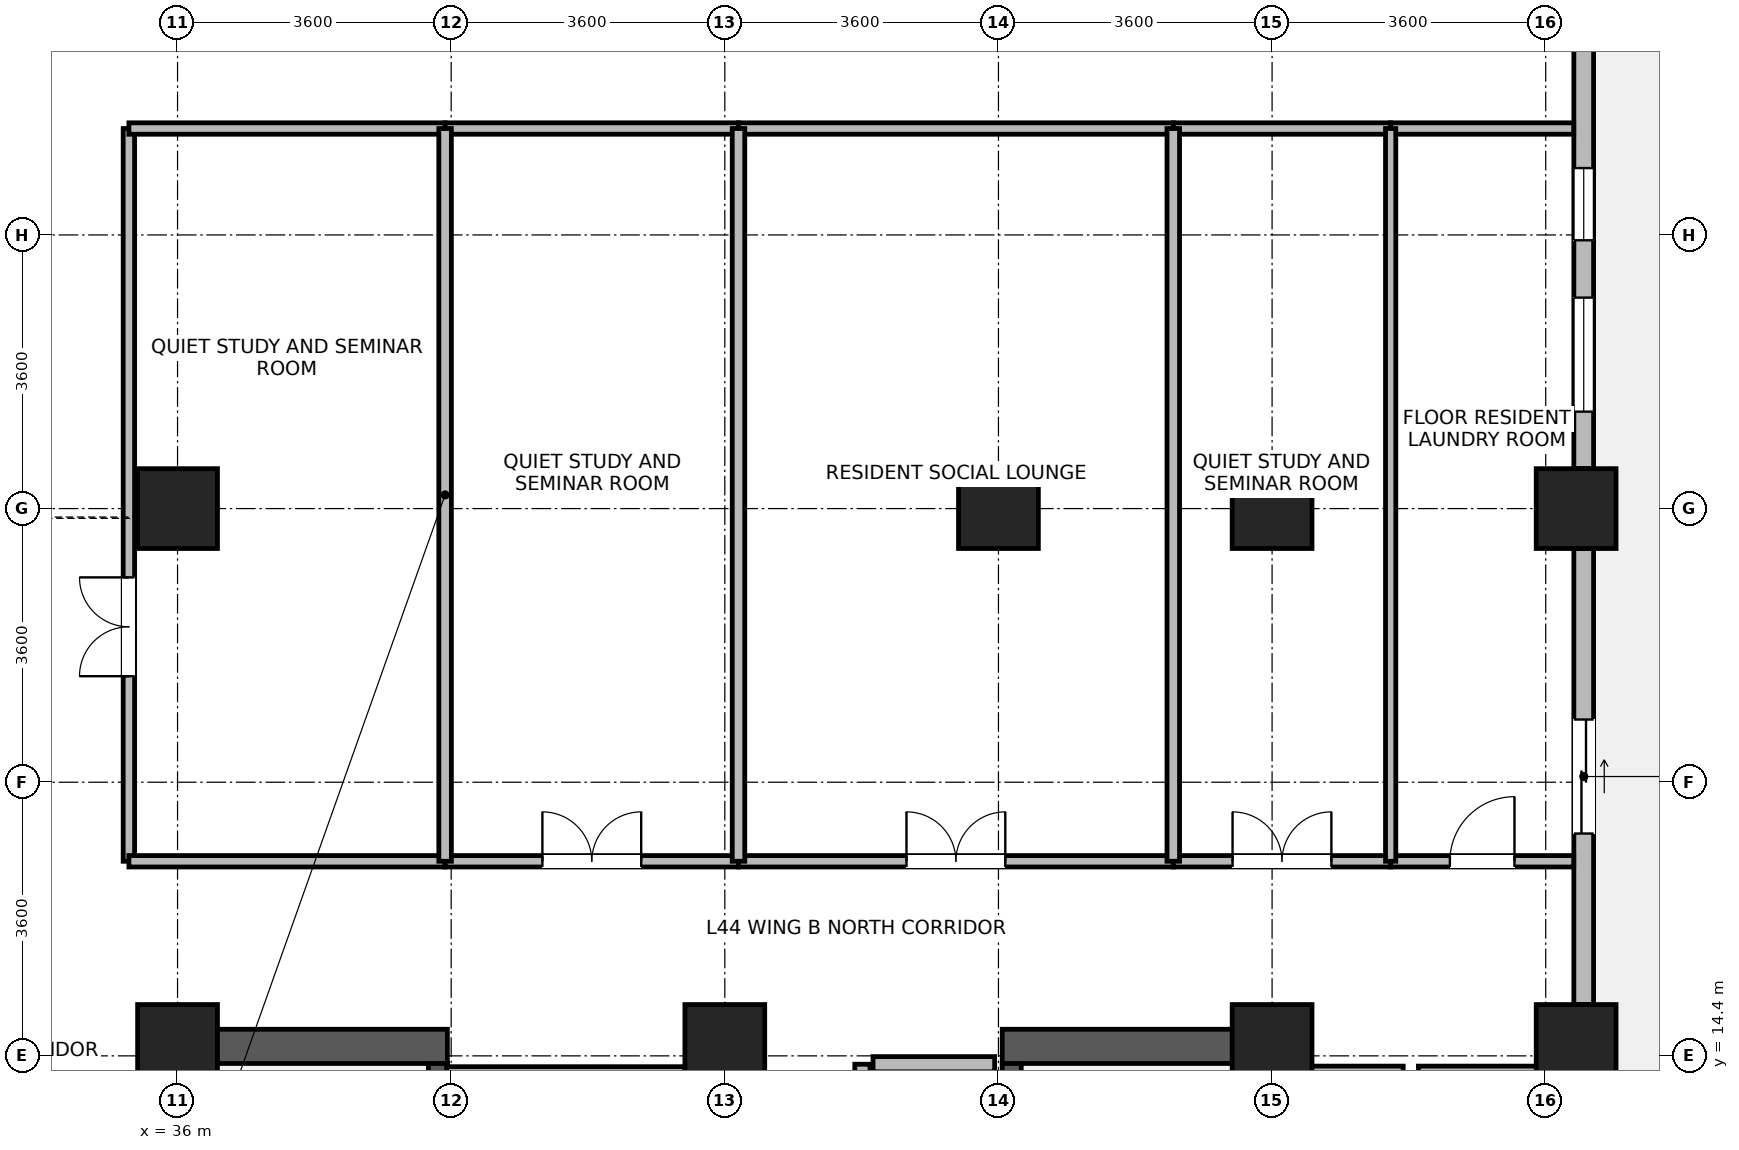
"""IFC4 building model, lengths in metres.
Left out: names, types, materials, properties, quantities, classifications, styles, units other than length and angle.
Written with IfcOpenShell. Run it as: python <this file> out.ifc"""

import sys

from ifc_helpers import new_model, si_unit, direction, frame, frame_2d, origin, origin_2d, place, context, subcontext, project, spatial, rectangle, extrude, source, transform, mapped, element, fill, save


model = new_model("IFC4")
c1 = context("Model", 3, precision=1e-05, world=origin(), true_north=direction((0.0, 1.0)))
c2 = subcontext(c1, "Body", "Model", "MODEL_VIEW")
j1 = project(units=[si_unit("LENGTHUNIT", "METRE"), si_unit("PLANEANGLEUNIT", "RADIAN")], contexts=[c1])
p1 = place(None, origin())
s1 = spatial("IfcSite", under=j1, at=p1, CompositionType="ELEMENT")
p2 = place(p1, origin())
s2 = spatial("IfcBuilding", under=s1, at=p2, CompositionType="ELEMENT")
p3 = place(p2, frame((0.0, 0.0, 173.5)))
s3 = spatial("IfcBuildingStorey", under=s2, at=p3, CompositionType="ELEMENT", Elevation=173.5)
for number, where, z_axis, x_axis in (
    (1, (36.125, 6.85, 0.0), (0.0, 0.0, 1.0), (0.0, 1.0, 0.0)),
    (2, (50.275, 6.85, 0.0), (0.0, 0.0, 1.0), (0.0, 1.0, 0.0)),
):
    element("IfcWall", number, at=place(p3, frame(where, z_axis=z_axis, x_axis=x_axis)), inside=s3, PredefinedType="SHEAR", context=c2, shape_type="SweptSolid", body=[
        extrude(rectangle(XDim=7.9, YDim=0.45, at=frame_2d((3.95, 0.0))), origin(), (0.0, 0.0, 1.0), 3.46),
    ])
for number, where, z_axis, x_axis in (
    (3, (36.35, 14.525, 0.0), (0.0, 0.0, 1.0), (1.0, 0.0, 0.0)),
    (4, (46.85, 14.525, 0.0), (0.0, 0.0, 1.0), (1.0, 0.0, 0.0)),
):
    element("IfcWall", number, at=place(p3, frame(where, z_axis=z_axis, x_axis=x_axis)), inside=s3, PredefinedType="SHEAR", context=c2, shape_type="SweptSolid", body=[
        extrude(rectangle(XDim=3.2, YDim=0.45, at=frame_2d((1.6, 0.0))), origin(), (0.0, 0.0, 1.0), 3.46),
    ])
p4 = place(p3, frame((39.425, 7.3, 0.0), z_axis=(0.0, 0.0, 1.0), x_axis=(0.0, 1.0, 0.0)))
e5 = element("IfcWall", 5, at=p4, inside=s3, PredefinedType="SHEAR", context=c2, shape_type="SweptSolid", body=[
    extrude(rectangle(XDim=7.0, YDim=0.25, at=frame_2d((3.5, 0.0))), origin(), (0.0, 0.0, 1.0), 3.46),
])
p5 = place(p4, frame((0.15, 0.0, 0.0)))
e6 = element("IfcOpeningElement", 6, at=p5, cuts=e5, PredefinedType="OPENING", context=c2, shape_type="SweptSolid", body=[
    extrude(rectangle(XDim=1.1, YDim=2.08, at=frame_2d((0.55, 1.04))), frame((0.0, 0.135, 0.0), z_axis=(0.0, -1.0, 0.0), x_axis=(1.0, 0.0, 0.0)), (0.0, 0.0, 1.0), 0.27),
])
p6 = place(p3, frame((46.975, 7.3, 0.0), z_axis=(0.0, 0.0, 1.0), x_axis=(0.0, 1.0, 0.0)))
e7 = element("IfcWall", 7, at=p6, inside=s3, PredefinedType="SHEAR", context=c2, shape_type="SweptSolid", body=[
    extrude(rectangle(XDim=7.0, YDim=0.25, at=frame_2d((3.5, 0.0))), origin(), (0.0, 0.0, 1.0), 3.46),
])
p7 = place(p6, frame((0.15, 0.0, 0.0)))
e8 = element("IfcOpeningElement", 8, at=p7, cuts=e7, PredefinedType="OPENING", context=c2, shape_type="SweptSolid", body=[
    extrude(rectangle(XDim=1.1, YDim=2.08, at=frame_2d((0.55, 1.04))), frame((0.0, 0.135, 0.0), z_axis=(0.0, -1.0, 0.0), x_axis=(1.0, 0.0, 0.0)), (0.0, 0.0, 1.0), 0.27),
])
m1 = source(origin(), c2, "Body", "SweptSolid", [
    extrude(rectangle(XDim=1.05, YDim=1.05, at=origin_2d()), origin(), (0.0, 0.0, 1.0), 3.7),
])
for number, where, z_axis, x_axis in (
    (9, (36.0, 21.6, 0.0), (0.0, 0.0, 1.0), (1.0, 0.0, 0.0)),
    (10, (46.8, 21.6, 0.0), (0.0, 0.0, 1.0), (1.0, 0.0, 0.0)),
    (11, (36.0, 14.55, 0.0), (0.0, 0.0, 1.0), (1.0, 0.0, 0.0)),
    (12, (43.2, 14.55, 0.0), (0.0, 0.0, 1.0), (1.0, 0.0, 0.0)),
    (13, (50.4, 14.55, 0.0), (0.0, 0.0, 1.0), (1.0, 0.0, 0.0)),
    (14, (50.4, 21.6, 0.0), (0.0, 0.0, 1.0), (1.0, 0.0, 0.0)),
    (15, (54.4, 14.55, 0.0), (0.0, 0.0, 1.0), (1.0, 0.0, 0.0)),
    (16, (54.4, 21.6, 0.0), (0.0, 0.0, 1.0), (1.0, 0.0, 0.0)),
):
    element("IfcColumn", number, at=place(p3, frame(where, z_axis=z_axis, x_axis=x_axis)), inside=s3, PredefinedType="COLUMN", context=c2, shape_type="MappedRepresentation", body=[
        mapped(m1, transform((0.0, 0.0, 0.0), x_axis=(1.0, 0.0, 0.0), y_axis=(0.0, 1.0, 0.0), z_axis=(0.0, 0.0, 1.0), scale=1.0)),
    ])
p8 = place(p3, frame((54.5, 21.074, 0.0), z_axis=(0.0, 0.0, 1.0), x_axis=(0.0, -1.0, 0.0)))
e17 = element("IfcWall", 17, at=p8, inside=s3, PredefinedType="STANDARD", context=c2, shape_type="SweptSolid", body=[
    extrude(rectangle(XDim=5.998, YDim=0.26, at=frame_2d((2.999, 0.0))), origin(), (0.0, 0.0, 1.0), 2.99),
])
p9 = place(p8, frame((2.249, 0.0, 0.0)))
e18 = element("IfcOpeningElement", 18, at=p9, cuts=e17, PredefinedType="OPENING", context=c2, shape_type="SweptSolid", body=[
    extrude(rectangle(XDim=1.5, YDim=2.15, at=frame_2d((0.75, 1.075))), frame((0.0, 0.14, 0.0), z_axis=(0.0, -1.0, 0.0), x_axis=(1.0, 0.0, 0.0)), (0.0, 0.0, 1.0), 0.28),
])
p10 = place(p3, frame((54.5, 28.124, 0.0), z_axis=(0.0, 0.0, 1.0), x_axis=(0.0, -1.0, 0.0)))
e19 = element("IfcWall", 19, at=p10, inside=s3, PredefinedType="STANDARD", context=c2, shape_type="SweptSolid", body=[
    extrude(rectangle(XDim=5.998, YDim=0.26, at=frame_2d((2.999, 0.0))), origin(), (0.0, 0.0, 1.0), 2.99),
])
p11 = place(p10, frame((3.749, 0.0, 0.85)))
e20 = element("IfcOpeningElement", 20, at=p11, cuts=e19, PredefinedType="OPENING", context=c2, shape_type="SweptSolid", body=[
    extrude(rectangle(XDim=1.5, YDim=1.85, at=frame_2d((0.75, 0.925))), frame((0.0, 0.14, 0.0), z_axis=(0.0, -1.0, 0.0), x_axis=(1.0, 0.0, 0.0)), (0.0, 0.0, 1.0), 0.28),
])
p12 = place(p10, frame((2.044, 0.0, 0.85)))
e21 = element("IfcOpeningElement", 21, at=p12, cuts=e19, PredefinedType="OPENING", context=c2, shape_type="SweptSolid", body=[
    extrude(rectangle(XDim=0.95, YDim=1.75, at=frame_2d((0.475, 0.875))), frame((0.0, 0.14, 0.0), z_axis=(0.0, -1.0, 0.0), x_axis=(1.0, 0.0, 0.0)), (0.0, 0.0, 1.0), 0.28),
])
p13 = place(p3, frame((50.475, 14.165, 0.0), z_axis=(0.0, 0.0, 1.0), x_axis=(1.0, 0.0, 0.0)))
e22 = element("IfcWall", 22, at=p13, inside=s3, PredefinedType="PARTITIONING", context=c2, shape_type="SweptSolid", body=[
    extrude(rectangle(XDim=1.65, YDim=0.2, at=frame_2d((0.825, 0.0))), origin(), (0.0, 0.0, 1.0), 3.44),
])
p14 = place(p3, frame((52.325, 14.165, 0.0), z_axis=(0.0, 0.0, 1.0), x_axis=(1.0, 0.0, 0.0)))
e23 = element("IfcWall", 23, at=p14, inside=s3, PredefinedType="PARTITIONING", context=c2, shape_type="SweptSolid", body=[
    extrude(rectangle(XDim=1.65, YDim=0.2, at=frame_2d((0.825, 0.0))), origin(), (0.0, 0.0, 1.0), 3.44),
])
p15 = place(p3, frame((45.15, 14.29, 0.0), z_axis=(0.0, 0.0, 1.0), x_axis=(1.0, 0.0, 0.0)))
e24 = element("IfcWall", 24, at=p15, inside=s3, PredefinedType="PARTITIONING", context=c2, shape_type="SweptSolid", body=[
    extrude(rectangle(XDim=1.6, YDim=0.2, at=frame_2d((0.8, 0.0))), origin(), (0.0, 0.0, 1.0), 2.44),
])
p16 = place(p3, frame((45.01, 11.61, 0.0), z_axis=(0.0, 0.0, 1.0), x_axis=(0.0, 1.0, 0.0)))
e25 = element("IfcWall", 25, at=p16, inside=s3, PredefinedType="PARTITIONING", context=c2, shape_type="SweptSolid", body=[
    extrude(rectangle(XDim=2.68, YDim=0.2, at=frame_2d((1.34, 0.0))), origin(), (0.0, 0.0, 1.0), 3.44),
])
p17 = place(p3, frame((35.36, 16.96, 0.0), z_axis=(0.0, 0.0, 1.0), x_axis=(0.0, 1.0, 0.0)))
e26 = element("IfcWall", 26, at=p17, inside=s3, PredefinedType="PARTITIONING", context=c2, shape_type="SweptSolid", body=[
    extrude(rectangle(XDim=9.64, YDim=0.15, at=frame_2d((4.82, 0.0))), origin(), (0.0, 0.0, 1.0), 3.44),
])
p18 = place(p17, frame((2.435, 0.0, 0.0)))
e27 = element("IfcOpeningElement", 27, at=p18, cuts=e26, PredefinedType="OPENING", context=c2, shape_type="SweptSolid", body=[
    extrude(rectangle(XDim=1.3, YDim=2.12, at=frame_2d((0.65, 1.06))), frame((0.0, 0.085, 0.0), z_axis=(0.0, -1.0, 0.0), x_axis=(1.0, 0.0, 0.0)), (0.0, 0.0, 1.0), 0.17),
])
p19 = place(p3, frame((43.38, 16.96, 0.0), z_axis=(0.0, 0.0, 1.0), x_axis=(1.0, 0.0, 0.0)))
e28 = element("IfcWall", 28, at=p19, inside=s3, PredefinedType="PARTITIONING", context=c2, shape_type="SweptSolid", body=[
    extrude(rectangle(XDim=5.72, YDim=0.15, at=frame_2d((2.86, 0.0))), origin(), (0.0, 0.0, 1.0), 3.44),
])
p20 = place(p19, frame((2.21, 0.0, 0.0)))
e29 = element("IfcOpeningElement", 29, at=p20, cuts=e28, PredefinedType="OPENING", context=c2, shape_type="SweptSolid", body=[
    extrude(rectangle(XDim=1.3, YDim=2.12, at=frame_2d((0.65, 1.06))), frame((0.0, 0.085, 0.0), z_axis=(0.0, -1.0, 0.0), x_axis=(1.0, 0.0, 0.0)), (0.0, 0.0, 1.0), 0.17),
])
p21 = place(p3, frame((43.38, 26.6, 0.0), z_axis=(0.0, 0.0, 1.0), x_axis=(1.0, 0.0, 0.0)))
e30 = element("IfcWall", 30, at=p21, inside=s3, PredefinedType="PARTITIONING", context=c2, shape_type="SweptSolid", body=[
    extrude(rectangle(XDim=5.72, YDim=0.15, at=frame_2d((2.86, 0.0))), origin(), (0.0, 0.0, 1.0), 3.44),
])
for number, where, z_axis, x_axis in (
    (31, (35.36, 16.96, 0.0), (0.0, 0.0, 1.0), (1.0, 0.0, 0.0)),
    (32, (35.36, 26.6, 0.0), (0.0, 0.0, 1.0), (1.0, 0.0, 0.0)),
):
    element("IfcWall", number, at=place(p3, frame(where, z_axis=z_axis, x_axis=x_axis)), inside=s3, PredefinedType="PARTITIONING", context=c2, shape_type="SweptSolid", body=[
        extrude(rectangle(XDim=4.16, YDim=0.15, at=frame_2d((2.08, 0.0))), origin(), (0.0, 0.0, 1.0), 3.44),
    ])
p22 = place(p3, frame((39.52, 16.96, 0.0), z_axis=(0.0, 0.0, 1.0), x_axis=(1.0, 0.0, 0.0)))
e33 = element("IfcWall", 33, at=p22, inside=s3, PredefinedType="PARTITIONING", context=c2, shape_type="SweptSolid", body=[
    extrude(rectangle(XDim=3.86, YDim=0.15, at=frame_2d((1.93, 0.0))), origin(), (0.0, 0.0, 1.0), 3.44),
])
p23 = place(p22, frame((1.28, 0.0, 0.0)))
e34 = element("IfcOpeningElement", 34, at=p23, cuts=e33, PredefinedType="OPENING", context=c2, shape_type="SweptSolid", body=[
    extrude(rectangle(XDim=1.3, YDim=2.12, at=frame_2d((0.65, 1.06))), frame((0.0, 0.085, 0.0), z_axis=(0.0, -1.0, 0.0), x_axis=(1.0, 0.0, 0.0)), (0.0, 0.0, 1.0), 0.17),
])
p24 = place(p3, frame((39.52, 26.6, 0.0), z_axis=(0.0, 0.0, 1.0), x_axis=(1.0, 0.0, 0.0)))
e35 = element("IfcWall", 35, at=p24, inside=s3, PredefinedType="PARTITIONING", context=c2, shape_type="SweptSolid", body=[
    extrude(rectangle(XDim=3.86, YDim=0.15, at=frame_2d((1.93, 0.0))), origin(), (0.0, 0.0, 1.0), 3.44),
])
p25 = place(p3, frame((49.1, 16.96, 0.0), z_axis=(0.0, 0.0, 1.0), x_axis=(1.0, 0.0, 0.0)))
e36 = element("IfcWall", 36, at=p25, inside=s3, PredefinedType="PARTITIONING", context=c2, shape_type="SweptSolid", body=[
    extrude(rectangle(XDim=2.86, YDim=0.15, at=frame_2d((1.43, 0.0))), origin(), (0.0, 0.0, 1.0), 3.44),
])
p26 = place(p25, frame((0.78, 0.0, 0.0)))
e37 = element("IfcOpeningElement", 37, at=p26, cuts=e36, PredefinedType="OPENING", context=c2, shape_type="SweptSolid", body=[
    extrude(rectangle(XDim=1.3, YDim=2.12, at=frame_2d((0.65, 1.06))), frame((0.0, 0.085, 0.0), z_axis=(0.0, -1.0, 0.0), x_axis=(1.0, 0.0, 0.0)), (0.0, 0.0, 1.0), 0.17),
])
p27 = place(p3, frame((49.1, 26.6, 0.0), z_axis=(0.0, 0.0, 1.0), x_axis=(1.0, 0.0, 0.0)))
e38 = element("IfcWall", 38, at=p27, inside=s3, PredefinedType="PARTITIONING", context=c2, shape_type="SweptSolid", body=[
    extrude(rectangle(XDim=2.86, YDim=0.15, at=frame_2d((1.43, 0.0))), origin(), (0.0, 0.0, 1.0), 3.44),
])
p28 = place(p3, frame((51.96, 16.96, 0.0), z_axis=(0.0, 0.0, 1.0), x_axis=(1.0, 0.0, 0.0)))
e39 = element("IfcWall", 39, at=p28, inside=s3, PredefinedType="PARTITIONING", context=c2, shape_type="SweptSolid", body=[
    extrude(rectangle(XDim=2.408, YDim=0.15, at=frame_2d((1.204, 0.0))), origin(), (0.0, 0.0, 1.0), 3.44),
])
p29 = place(p28, frame((0.779, 0.0, 0.0)))
e40 = element("IfcOpeningElement", 40, at=p29, cuts=e39, PredefinedType="OPENING", context=c2, shape_type="SweptSolid", body=[
    extrude(rectangle(XDim=0.85, YDim=2.04, at=frame_2d((0.425, 1.02))), frame((0.0, 0.085, 0.0), z_axis=(0.0, -1.0, 0.0), x_axis=(1.0, 0.0, 0.0)), (0.0, 0.0, 1.0), 0.17),
])
p30 = place(p3, frame((51.96, 26.6, 0.0), z_axis=(0.0, 0.0, 1.0), x_axis=(1.0, 0.0, 0.0)))
e41 = element("IfcWall", 41, at=p30, inside=s3, PredefinedType="PARTITIONING", context=c2, shape_type="SweptSolid", body=[
    extrude(rectangle(XDim=2.408, YDim=0.15, at=frame_2d((1.204, 0.0))), origin(), (0.0, 0.0, 1.0), 3.44),
])
for number, where, z_axis, x_axis in (
    (42, (39.52, 16.96, 0.0), (0.0, 0.0, 1.0), (0.0, 1.0, 0.0)),
    (43, (43.38, 16.96, 0.0), (0.0, 0.0, 1.0), (0.0, 1.0, 0.0)),
    (44, (49.1, 16.96, 0.0), (0.0, 0.0, 1.0), (0.0, 1.0, 0.0)),
):
    element("IfcWall", number, at=place(p3, frame(where, z_axis=z_axis, x_axis=x_axis)), inside=s3, PredefinedType="PARTITIONING", context=c2, shape_type="SweptSolid", body=[
        extrude(rectangle(XDim=9.64, YDim=0.165, at=frame_2d((4.82, 0.0))), origin(), (0.0, 0.0, 1.0), 3.44),
    ])
p31 = place(p3, frame((51.96, 16.96, 0.0), z_axis=(0.0, 0.0, 1.0), x_axis=(0.0, 1.0, 0.0)))
e45 = element("IfcWall", 45, at=p31, inside=s3, PredefinedType="PARTITIONING", context=c2, shape_type="SweptSolid", body=[
    extrude(rectangle(XDim=9.64, YDim=0.135, at=frame_2d((4.82, 0.0))), origin(), (0.0, 0.0, 1.0), 3.44),
])
p32 = place(p3, frame((39.54, 14.2, 0.0), z_axis=(0.0, 0.0, 1.0), x_axis=(1.0, 0.0, 0.0)))
e46 = element("IfcWall", 46, at=p32, inside=s3, PredefinedType="PARTITIONING", context=c2, shape_type="SweptSolid", body=[
    extrude(rectangle(XDim=3.135, YDim=0.115, at=frame_2d((1.567, 0.0))), origin(), (0.0, 0.0, 1.0), 2.44),
])
p33 = place(p9, origin())
e47 = element("IfcDoor", 47, at=p33, inside=s3, OperationType="SLIDING_TO_LEFT", PredefinedType="DOOR", context=c2, shape_type="SweptSolid", body=[
    extrude(rectangle(XDim=1.5, YDim=2.15, at=frame_2d((0.75, 1.075))), frame((0.0, 0.025, 0.0), z_axis=(0.0, -1.0, 0.0), x_axis=(1.0, 0.0, 0.0)), (0.0, 0.0, 1.0), 0.05),
])
fill(e18, e47)
p34 = place(p11, origin())
e48 = element("IfcWindow", 48, at=p34, inside=s3, PartitioningType="SINGLE_PANEL", PredefinedType="WINDOW", context=c2, shape_type="SweptSolid", body=[
    extrude(rectangle(XDim=1.5, YDim=1.85, at=frame_2d((0.75, 0.925))), frame((0.0, 0.03, 0.0), z_axis=(0.0, -1.0, 0.0), x_axis=(1.0, 0.0, 0.0)), (0.0, 0.0, 1.0), 0.06),
])
fill(e20, e48)
p35 = place(p12, origin())
e49 = element("IfcWindow", 49, at=p35, inside=s3, PartitioningType="SINGLE_PANEL", PredefinedType="WINDOW", context=c2, shape_type="SweptSolid", body=[
    extrude(rectangle(XDim=0.95, YDim=1.75, at=frame_2d((0.475, 0.875))), frame((0.0, 0.03, 0.0), z_axis=(0.0, -1.0, 0.0), x_axis=(1.0, 0.0, 0.0)), (0.0, 0.0, 1.0), 0.06),
])
fill(e21, e49)
p36 = place(p18, origin())
e50 = element("IfcDoor", 50, at=p36, inside=s3, OperationType="DOUBLE_DOOR_SINGLE_SWING", PredefinedType="DOOR", context=c2, shape_type="SweptSolid", body=[
    extrude(rectangle(XDim=1.3, YDim=2.12, at=frame_2d((0.65, 1.06))), frame((0.0, 0.025, 0.0), z_axis=(0.0, -1.0, 0.0), x_axis=(1.0, 0.0, 0.0)), (0.0, 0.0, 1.0), 0.05),
])
fill(e27, e50)
p37 = place(p20, origin())
e51 = element("IfcDoor", 51, at=p37, inside=s3, OperationType="DOUBLE_DOOR_SINGLE_SWING", PredefinedType="DOOR", context=c2, shape_type="SweptSolid", body=[
    extrude(rectangle(XDim=1.3, YDim=2.12, at=frame_2d((0.65, 1.06))), frame((0.0, 0.025, 0.0), z_axis=(0.0, -1.0, 0.0), x_axis=(1.0, 0.0, 0.0)), (0.0, 0.0, 1.0), 0.05),
])
fill(e29, e51)
p38 = place(p23, origin())
e52 = element("IfcDoor", 52, at=p38, inside=s3, OperationType="DOUBLE_DOOR_SINGLE_SWING", PredefinedType="DOOR", context=c2, shape_type="SweptSolid", body=[
    extrude(rectangle(XDim=1.3, YDim=2.12, at=frame_2d((0.65, 1.06))), frame((0.0, 0.025, 0.0), z_axis=(0.0, -1.0, 0.0), x_axis=(1.0, 0.0, 0.0)), (0.0, 0.0, 1.0), 0.05),
])
fill(e34, e52)
p39 = place(p26, origin())
e53 = element("IfcDoor", 53, at=p39, inside=s3, OperationType="DOUBLE_DOOR_SINGLE_SWING", PredefinedType="DOOR", context=c2, shape_type="SweptSolid", body=[
    extrude(rectangle(XDim=1.3, YDim=2.12, at=frame_2d((0.65, 1.06))), frame((0.0, 0.025, 0.0), z_axis=(0.0, -1.0, 0.0), x_axis=(1.0, 0.0, 0.0)), (0.0, 0.0, 1.0), 0.05),
])
fill(e37, e53)
p40 = place(p29, origin())
e54 = element("IfcDoor", 54, at=p40, inside=s3, OperationType="SINGLE_SWING_RIGHT", PredefinedType="DOOR", context=c2, shape_type="SweptSolid", body=[
    extrude(rectangle(XDim=0.85, YDim=2.04, at=frame_2d((0.425, 1.02))), frame((0.0, 0.025, 0.0), z_axis=(0.0, -1.0, 0.0), x_axis=(1.0, 0.0, 0.0)), (0.0, 0.0, 1.0), 0.05),
])
fill(e40, e54)
save(model, sys.argv[1])
